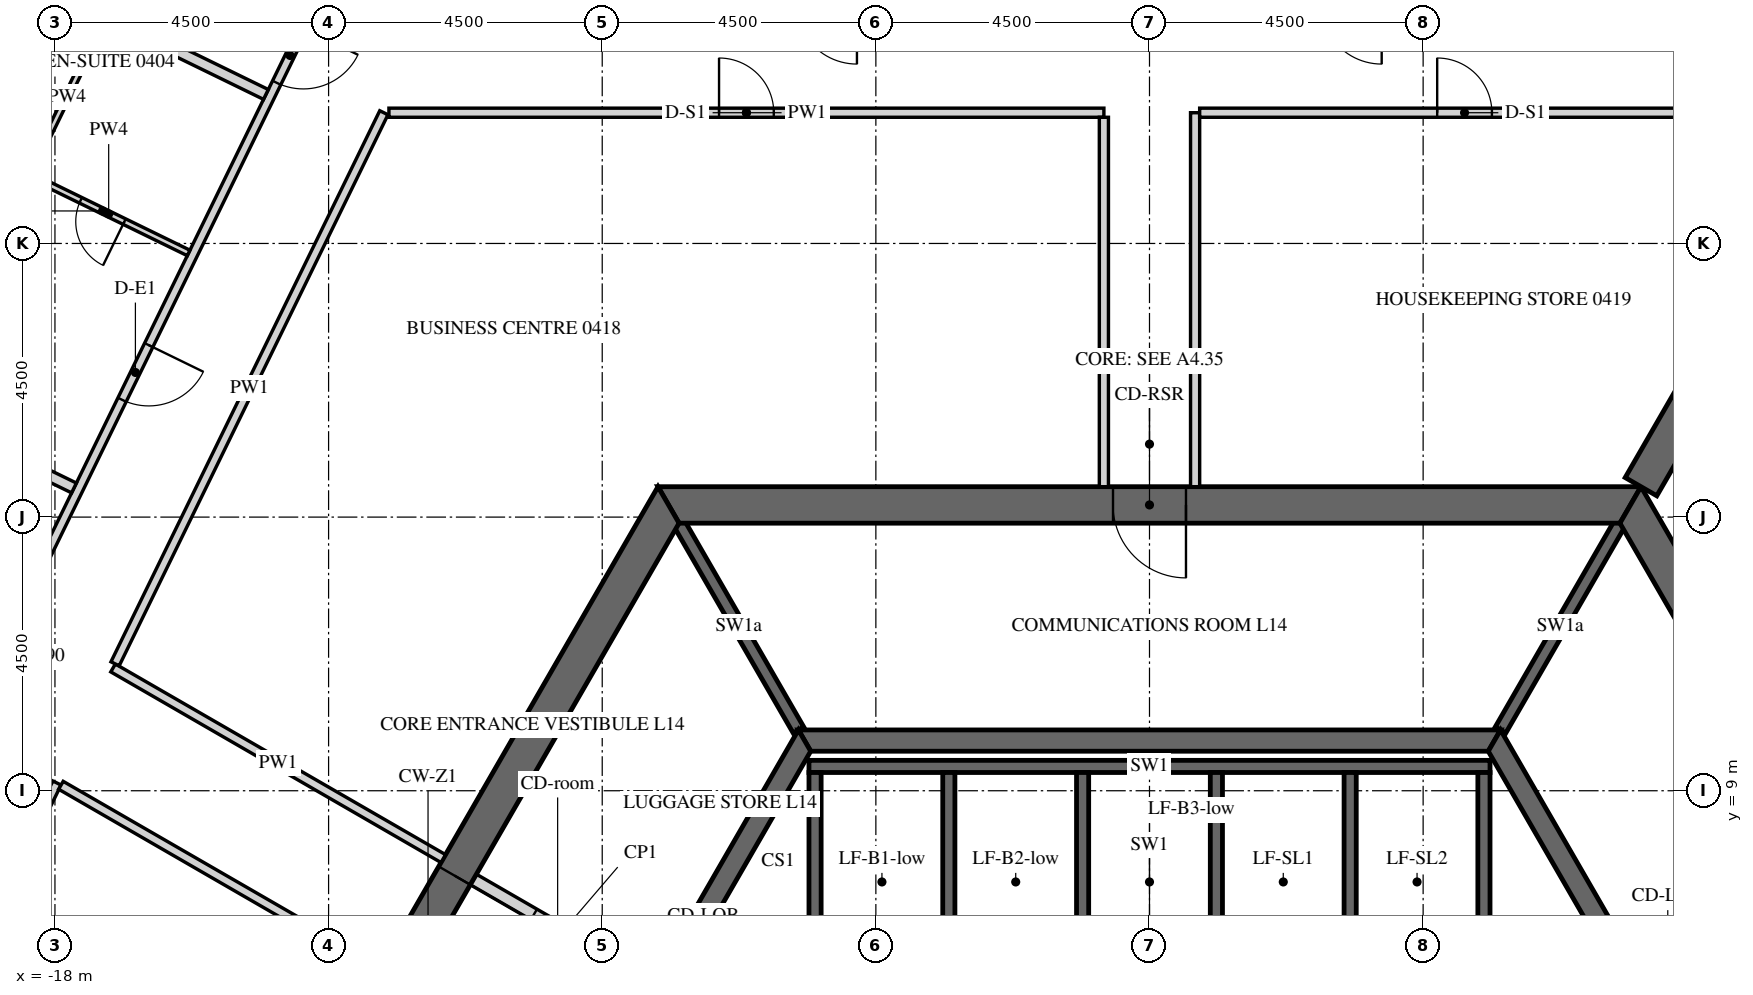
"""IFC4 building model, lengths in metres.
Left out: names, types, materials, properties, quantities, classifications, styles, units other than length and angle.
Written with IfcOpenShell. Run it as: python <this file> out.ifc"""

import sys

from ifc_helpers import new_model, si_unit, direction, frame, frame_2d, origin, place, context, subcontext, project, spatial, polyline, rectangle, outline, extrude, element, fill, save


model = new_model("IFC4")
c1 = context("Model", 3, precision=1e-05, world=origin(), true_north=direction((0.0, 1.0)))
c2 = subcontext(c1, "Body", "Model", "MODEL_VIEW")
j1 = project(units=[si_unit("LENGTHUNIT", "METRE"), si_unit("PLANEANGLEUNIT", "RADIAN")], contexts=[c1])
p1 = place(None, origin())
s1 = spatial("IfcSite", under=j1, at=p1, CompositionType="ELEMENT")
p2 = place(p1, origin())
s2 = spatial("IfcBuilding", under=s1, at=p2, CompositionType="ELEMENT")
p3 = place(p2, frame((0.0, 0.0, 68.7)))
s3 = spatial("IfcBuildingStorey", under=s2, at=p3, CompositionType="ELEMENT", Elevation=68.7)
p4 = place(p3, frame((-7.91, 13.7, -0.15), z_axis=(0.0, 0.0, 1.0), x_axis=(-0.499999880136, -0.866025472988, 0.0)))
e1 = element("IfcWall", 1, at=p4, inside=s3, PredefinedType="SHEAR", context=c2, shape_type="SweptSolid", body=[
    extrude(outline(polyline([(-0.173, -0.3), (15.993, -0.3), (15.646, 0.3), (0.173, 0.3), (-0.173, -0.3)])), origin(), (0.0, 0.0, 1.0), 3.9),
])
p5 = place(p4, frame((7.039, 0.0, 0.15)))
e2 = element("IfcOpeningElement", 2, at=p5, cuts=e1, PredefinedType="OPENING", context=c2, shape_type="SweptSolid", body=[
    extrude(rectangle(XDim=1.8, YDim=2.4, at=frame_2d((0.9, 1.2))), frame((0.0, 0.31, 0.0), z_axis=(0.0, -1.0, 0.0), x_axis=(1.0, 0.0, 0.0)), (0.0, 0.0, 1.0), 0.62),
])
p6 = place(p3, frame((15.819, 0.0, -0.15), z_axis=(0.0, 0.0, 1.0), x_axis=(-0.499999880136, 0.866025472988, 0.0)))
e3 = element("IfcWall", 3, at=p6, inside=s3, PredefinedType="SHEAR", context=c2, shape_type="SweptSolid", body=[
    extrude(outline(polyline([(-0.173, -0.3), (15.993, -0.3), (15.646, 0.3), (0.173, 0.3), (-0.173, -0.3)])), origin(), (0.0, 0.0, 1.0), 3.9),
])
p7 = place(p6, frame((6.981, 0.0, 0.15)))
e4 = element("IfcOpeningElement", 4, at=p7, cuts=e3, PredefinedType="OPENING", context=c2, shape_type="SweptSolid", body=[
    extrude(rectangle(XDim=1.8, YDim=2.4, at=frame_2d((0.9, 1.2))), frame((0.0, 0.31, 0.0), z_axis=(0.0, -1.0, 0.0), x_axis=(1.0, 0.0, 0.0)), (0.0, 0.0, 1.0), 0.62),
])
p8 = place(p3, frame((7.91, 13.7, -0.15), z_axis=(0.0, 0.0, 1.0), x_axis=(-1.0, 0.0, 0.0)))
e5 = element("IfcWall", 5, at=p8, inside=s3, PredefinedType="SHEAR", context=c2, shape_type="SweptSolid", body=[
    extrude(outline(polyline([(-0.173, -0.3), (15.993, -0.3), (15.646, 0.3), (0.173, 0.3), (-0.173, -0.3)])), origin(), (0.0, 0.0, 1.0), 3.9),
])
p9 = place(p8, frame((7.31, 0.0, 0.15)))
e6 = element("IfcOpeningElement", 6, at=p9, cuts=e5, PredefinedType="OPENING", context=c2, shape_type="SweptSolid", body=[
    extrude(rectangle(XDim=1.2, YDim=2.4, at=frame_2d((0.6, 1.2))), frame((0.0, 0.31, 0.0), z_axis=(0.0, -1.0, 0.0), x_axis=(1.0, 0.0, 0.0)), (0.0, 0.0, 1.0), 0.62),
])
p10 = place(p3, frame((8.083, 14.0, -0.15), z_axis=(0.0, 0.0, 1.0), x_axis=(0.499997680643, 0.866026742862, 0.0)))
e7 = element("IfcWall", 7, at=p10, inside=s3, PredefinedType="SHEAR", context=c2, shape_type="SweptSolid", body=[
    extrude(rectangle(XDim=16.509, YDim=0.6, at=frame_2d((8.254, 0.0))), origin(), (0.0, 0.0, 1.0), 3.9),
])
p11 = place(p10, frame((7.354, 0.0, 0.15)))
e8 = element("IfcOpeningElement", 8, at=p11, cuts=e7, PredefinedType="OPENING", context=c2, shape_type="SweptSolid", body=[
    extrude(rectangle(XDim=1.8, YDim=2.4, at=frame_2d((0.9, 1.2))), frame((0.0, 0.31, 0.0), z_axis=(0.0, -1.0, 0.0), x_axis=(1.0, 0.0, 0.0)), (0.0, 0.0, 1.0), 0.62),
])
p12 = place(p3, frame((-5.673, 9.825, -0.15), z_axis=(0.0, 0.0, 1.0), x_axis=(-0.499995046907, -0.866028263435, 0.0)))
e9 = element("IfcWall", 9, at=p12, inside=s3, PredefinedType="SHEAR", context=c2, shape_type="SweptSolid", body=[
    extrude(outline(polyline([(-0.101, -0.175), (11.446, -0.175), (11.244, 0.175), (0.101, 0.175), (-0.101, -0.175)])), origin(), (0.0, 0.0, 1.0), 3.9),
])
p13 = place(p12, frame((4.801, 0.0, 0.15)))
e10 = element("IfcOpeningElement", 10, at=p13, cuts=e9, PredefinedType="OPENING", context=c2, shape_type="SweptSolid", body=[
    extrude(rectangle(XDim=1.8, YDim=2.4, at=frame_2d((0.9, 1.2))), frame((0.0, 0.185, 0.0), z_axis=(0.0, -1.0, 0.0), x_axis=(1.0, 0.0, 0.0)), (0.0, 0.0, 1.0), 0.37),
])
p14 = place(p3, frame((11.345, 0.0, -0.15), z_axis=(0.0, 0.0, 1.0), x_axis=(-0.499995046907, 0.866028263435, 0.0)))
e11 = element("IfcWall", 11, at=p14, inside=s3, PredefinedType="SHEAR", context=c2, shape_type="SweptSolid", body=[
    extrude(outline(polyline([(-0.101, -0.175), (11.446, -0.175), (11.244, 0.175), (0.101, 0.175), (-0.101, -0.175)])), origin(), (0.0, 0.0, 1.0), 3.9),
])
p15 = place(p14, frame((4.744, 0.0, 0.15)))
e12 = element("IfcOpeningElement", 12, at=p15, cuts=e11, PredefinedType="OPENING", context=c2, shape_type="SweptSolid", body=[
    extrude(rectangle(XDim=1.8, YDim=2.4, at=frame_2d((0.9, 1.2))), frame((0.0, 0.185, 0.0), z_axis=(0.0, -1.0, 0.0), x_axis=(1.0, 0.0, 0.0)), (0.0, 0.0, 1.0), 0.37),
])
p16 = place(p3, frame((5.673, 9.825, -0.15), z_axis=(0.0, 0.0, 1.0), x_axis=(-1.0, 0.0, 0.0)))
e13 = element("IfcWall", 13, at=p16, inside=s3, PredefinedType="SHEAR", context=c2, shape_type="SweptSolid", body=[
    extrude(outline(polyline([(-0.101, -0.175), (11.446, -0.175), (11.244, 0.175), (0.101, 0.175), (-0.101, -0.175)])), origin(), (0.0, 0.0, 1.0), 3.9),
])
p17 = place(p3, frame((-5.6, 9.4, -0.25), z_axis=(0.0, 0.0, 1.0), x_axis=(1.0, 0.0, 0.0)))
e14 = element("IfcWall", 14, at=p17, inside=s3, PredefinedType="SHEAR", context=c2, shape_type="SweptSolid", body=[
    extrude(rectangle(XDim=11.2, YDim=0.2, at=frame_2d((5.6, 0.0))), origin(), (0.0, 0.0, 1.0), 3.9),
])
for number, where, z_axis, x_axis in (
    (15, (-5.5, 6.4, -0.25), (0.0, 0.0, 1.0), (0.0, 1.0, 0.0)),
    (16, (-3.3, 6.4, -0.25), (0.0, 0.0, 1.0), (0.0, 1.0, 0.0)),
    (17, (-1.1, 6.4, -0.25), (0.0, 0.0, 1.0), (0.0, 1.0, 0.0)),
    (18, (1.1, 6.4, -0.25), (0.0, 0.0, 1.0), (0.0, 1.0, 0.0)),
    (19, (3.3, 6.4, -0.25), (0.0, 0.0, 1.0), (0.0, 1.0, 0.0)),
    (20, (5.5, 6.4, -0.25), (0.0, 0.0, 1.0), (0.0, 1.0, 0.0)),
):
    element("IfcWall", number, at=place(p3, frame(where, z_axis=z_axis, x_axis=x_axis)), inside=s3, PredefinedType="SHEAR", context=c2, shape_type="SweptSolid", body=[
        extrude(rectangle(XDim=2.9, YDim=0.2, at=frame_2d((1.45, 0.0))), origin(), (0.0, 0.0, 1.0), 3.9),
    ])
for number, where, z_axis, x_axis in (
    (21, (5.773, 10.0, -0.15), (0.0, 0.0, 1.0), (0.5, 0.866, 0.0)),
    (22, (-5.773, 10.0, -0.15), (0.0, 0.0, 1.0), (-0.5, 0.866, 0.0)),
):
    element("IfcWall", number, at=place(p3, frame(where, z_axis=z_axis, x_axis=x_axis)), inside=s3, PredefinedType="SHEAR", context=c2, shape_type="SweptSolid", body=[
        extrude(rectangle(XDim=3.926, YDim=0.2, at=frame_2d((1.963, 0.0))), origin(), (0.0, 0.0, 1.0), 3.9),
    ])
p18 = place(p3, frame((-8.175, 5.841, 0.0), z_axis=(0.0, 0.0, 1.0), x_axis=(-0.866020560687, 0.500008388397, 0.0)))
e23 = element("IfcWall", 23, at=p18, inside=s3, PredefinedType="PARTITIONING", context=c2, shape_type="SweptSolid", body=[
    extrude(rectangle(XDim=3.4, YDim=0.2, at=frame_2d((1.7, 0.0))), origin(), (0.0, 0.0, 1.0), 3.65),
])
p19 = place(p18, frame((1.35, 0.0, 0.0)))
e24 = element("IfcOpeningElement", 24, at=p19, cuts=e23, PredefinedType="OPENING", context=c2, shape_type="SweptSolid", body=[
    extrude(rectangle(XDim=0.9, YDim=2.1, at=frame_2d((0.45, 1.05))), frame((0.0, 0.11, 0.0), z_axis=(0.0, -1.0, 0.0), x_axis=(1.0, 0.0, 0.0)), (0.0, 0.0, 1.0), 0.22),
])
p20 = place(p3, frame((-13.752, 21.875, 0.0), z_axis=(0.0, 0.0, 1.0), x_axis=(-0.438374473378, -0.898792423806, 0.0)))
e25 = element("IfcWall", 25, at=p20, inside=s3, PredefinedType="PARTITIONING", context=c2, shape_type="SweptSolid", body=[
    extrude(rectangle(XDim=21.918, YDim=0.15, at=frame_2d((10.959, 0.0))), origin(), (0.0, 0.0, 1.0), 2.988),
])
p21 = place(p20, frame((0.371, 0.0, 0.0)))
e26 = element("IfcOpeningElement", 26, at=p21, cuts=e25, PredefinedType="OPENING", context=c2, shape_type="SweptSolid", body=[
    extrude(rectangle(XDim=1.0, YDim=2.1, at=frame_2d((0.5, 1.05))), frame((0.0, 0.085, 0.0), z_axis=(0.0, -1.0, 0.0), x_axis=(1.0, 0.0, 0.0)), (0.0, 0.0, 1.0), 0.17),
])
p22 = place(p20, frame((6.171, 0.0, 0.0)))
e27 = element("IfcOpeningElement", 27, at=p22, cuts=e25, PredefinedType="OPENING", context=c2, shape_type="SweptSolid", body=[
    extrude(rectangle(XDim=1.0, YDim=2.1, at=frame_2d((0.5, 1.05))), frame((0.0, 0.085, 0.0), z_axis=(0.0, -1.0, 0.0), x_axis=(1.0, 0.0, 0.0)), (0.0, 0.0, 1.0), 0.17),
])
p23 = place(p20, frame((13.612, 0.0, 0.0)))
e28 = element("IfcOpeningElement", 28, at=p23, cuts=e25, PredefinedType="OPENING", context=c2, shape_type="SweptSolid", body=[
    extrude(rectangle(XDim=1.0, YDim=2.1, at=frame_2d((0.5, 1.05))), frame((0.0, 0.085, 0.0), z_axis=(0.0, -1.0, 0.0), x_axis=(1.0, 0.0, 0.0)), (0.0, 0.0, 1.0), 0.17),
])
p24 = place(p3, frame((-11.614, 7.884, 0.0), z_axis=(0.0, 0.0, 1.0), x_axis=(-0.866025438137, 0.4999999405, 0.0)))
e29 = element("IfcWall", 29, at=p24, inside=s3, PredefinedType="PARTITIONING", context=c2, shape_type="SweptSolid", body=[
    extrude(rectangle(XDim=6.271, YDim=0.15, at=frame_2d((3.135, 0.0))), origin(), (0.0, 0.0, 1.0), 2.988),
])
p25 = place(p3, frame((-17.011, 11.087, 0.0), z_axis=(0.0, 0.0, 1.0), x_axis=(0.43836877185, 0.898795204631, 0.0)))
e30 = element("IfcWall", 30, at=p25, inside=s3, PredefinedType="PARTITIONING", context=c2, shape_type="SweptSolid", body=[
    extrude(rectangle(XDim=10.083, YDim=0.15, at=frame_2d((5.042, 0.0))), origin(), (0.0, 0.0, 1.0), 2.988),
])
p26 = place(p3, frame((-12.508, 20.15, 0.0), z_axis=(0.0, 0.0, 1.0), x_axis=(1.0, 0.0, 0.0)))
e31 = element("IfcWall", 31, at=p26, inside=s3, PredefinedType="PARTITIONING", context=c2, shape_type="SweptSolid", body=[
    extrude(rectangle(XDim=11.758, YDim=0.15, at=frame_2d((5.879, 0.0))), origin(), (0.0, 0.0, 1.0), 2.988),
])
p27 = place(p26, frame((5.429, 0.0, 0.0)))
e32 = element("IfcOpeningElement", 32, at=p27, cuts=e31, PredefinedType="OPENING", context=c2, shape_type="SweptSolid", body=[
    extrude(rectangle(XDim=0.9, YDim=2.1, at=frame_2d((0.45, 1.05))), frame((0.0, 0.085, 0.0), z_axis=(0.0, -1.0, 0.0), x_axis=(1.0, 0.0, 0.0)), (0.0, 0.0, 1.0), 0.17),
])
p28 = place(p3, frame((-0.75, 20.075, 0.0), z_axis=(0.0, 0.0, 1.0), x_axis=(0.0, -1.0, 0.0)))
e33 = element("IfcWall", 33, at=p28, inside=s3, PredefinedType="PARTITIONING", context=c2, shape_type="SweptSolid", body=[
    extrude(rectangle(XDim=6.075, YDim=0.15, at=frame_2d((3.038, 0.0))), origin(), (0.0, 0.0, 1.0), 2.988),
])
p29 = place(p3, frame((0.75, 14.0, 0.0), z_axis=(0.0, 0.0, 1.0), x_axis=(0.0, 1.0, 0.0)))
e34 = element("IfcWall", 34, at=p29, inside=s3, PredefinedType="PARTITIONING", context=c2, shape_type="SweptSolid", body=[
    extrude(rectangle(XDim=6.15, YDim=0.15, at=frame_2d((3.075, 0.0))), origin(), (0.0, 0.0, 1.0), 2.988),
])
p30 = place(p3, frame((0.825, 20.15, 0.0), z_axis=(0.0, 0.0, 1.0), x_axis=(1.0, 0.0, 0.0)))
e35 = element("IfcWall", 35, at=p30, inside=s3, PredefinedType="PARTITIONING", context=c2, shape_type="SweptSolid", body=[
    extrude(rectangle(XDim=8.712, YDim=0.15, at=frame_2d((4.356, 0.0))), origin(), (0.0, 0.0, 1.0), 2.988),
])
p31 = place(p30, frame((3.906, 0.0, 0.0)))
e36 = element("IfcOpeningElement", 36, at=p31, cuts=e35, PredefinedType="OPENING", context=c2, shape_type="SweptSolid", body=[
    extrude(rectangle(XDim=0.9, YDim=2.1, at=frame_2d((0.45, 1.05))), frame((0.0, 0.085, 0.0), z_axis=(0.0, -1.0, 0.0), x_axis=(1.0, 0.0, 0.0)), (0.0, 0.0, 1.0), 0.17),
])
p32 = place(p3, frame((-22.219, 0.41, 0.0), z_axis=(0.0, 0.0, 1.0), x_axis=(0.438391891827, 0.898783927972, 0.0)))
e37 = element("IfcWall", 37, at=p32, inside=s3, PredefinedType="PARTITIONING", context=c2, shape_type="SweptSolid", body=[
    extrude(rectangle(XDim=9.699, YDim=0.15, at=frame_2d((4.85, 0.0))), origin(), (0.0, 0.0, 1.0), 2.988),
])
p33 = place(p32, frame((4.4, 0.0, 0.0)))
e38 = element("IfcOpeningElement", 38, at=p33, cuts=e37, PredefinedType="OPENING", context=c2, shape_type="SweptSolid", body=[
    extrude(rectangle(XDim=0.9, YDim=2.1, at=frame_2d((0.45, 1.05))), frame((0.0, 0.085, 0.0), z_axis=(0.0, -1.0, 0.0), x_axis=(1.0, 0.0, 0.0)), (0.0, 0.0, 1.0), 0.17),
])
p34 = place(p3, frame((-17.902, 9.09, 0.0), z_axis=(0.0, 0.0, 1.0), x_axis=(0.866036368755, -0.499981007633, 0.0)))
e39 = element("IfcWall", 39, at=p34, inside=s3, PredefinedType="PARTITIONING", context=c2, shape_type="SweptSolid", body=[
    extrude(rectangle(XDim=6.049, YDim=0.15, at=frame_2d((3.024, 0.0))), origin(), (0.0, 0.0, 1.0), 2.988),
])
p35 = place(p3, frame((-21.204, 23.706, 0.0), z_axis=(0.0, 0.0, 1.0), x_axis=(0.898796252669, -0.438366623032, 0.0)))
e40 = element("IfcWall", 40, at=p35, inside=s3, PredefinedType="PARTITIONING", context=c2, shape_type="SweptSolid", body=[
    extrude(rectangle(XDim=7.425, YDim=0.18, at=frame_2d((3.712, 0.0))), origin(), (0.0, 0.0, 1.0), 2.988),
])
p36 = place(p3, frame((-15.802, 17.844, 0.0), z_axis=(0.0, 0.0, 1.0), x_axis=(-0.898790906006, 0.438377585285, 0.0)))
e41 = element("IfcWall", 41, at=p36, inside=s3, PredefinedType="PARTITIONING", context=c2, shape_type="SweptSolid", body=[
    extrude(rectangle(XDim=2.925, YDim=0.1, at=frame_2d((1.462, 0.0))), origin(), (0.0, 0.0, 1.0), 2.988),
])
p37 = place(p36, frame((1.175, 0.0, 0.0)))
e42 = element("IfcOpeningElement", 42, at=p37, cuts=e41, PredefinedType="OPENING", context=c2, shape_type="SweptSolid", body=[
    extrude(rectangle(XDim=0.8, YDim=2.1, at=frame_2d((0.4, 1.05))), frame((0.0, 0.06, 0.0), z_axis=(0.0, -1.0, 0.0), x_axis=(1.0, 0.0, 0.0)), (0.0, 0.0, 1.0), 0.12),
])
p38 = place(p3, frame((-18.409, 19.171, 0.0), z_axis=(0.0, 0.0, 1.0), x_axis=(0.438416660488, 0.898771846359, 0.0)))
e43 = element("IfcWall", 43, at=p38, inside=s3, PredefinedType="PARTITIONING", context=c2, shape_type="SweptSolid", body=[
    extrude(rectangle(XDim=2.76, YDim=0.1, at=frame_2d((1.38, 0.0))), origin(), (0.0, 0.0, 1.0), 2.988),
])
p39 = place(p3, frame((-24.36, 17.234, 0.0), z_axis=(0.0, 0.0, 1.0), x_axis=(0.898796252669, -0.438366623032, 0.0)))
e44 = element("IfcWall", 44, at=p39, inside=s3, PredefinedType="PARTITIONING", context=c2, shape_type="SweptSolid", body=[
    extrude(rectangle(XDim=7.425, YDim=0.18, at=frame_2d((3.712, 0.0))), origin(), (0.0, 0.0, 1.0), 2.988),
])
p40 = place(p5, origin())
e45 = element("IfcDoor", 45, at=p40, inside=s3, OperationType="DOUBLE_DOOR_SINGLE_SWING", PredefinedType="DOOR", context=c2, shape_type="SweptSolid", body=[
    extrude(rectangle(XDim=1.8, YDim=2.4, at=frame_2d((0.9, 1.2))), frame((0.0, 0.025, 0.0), z_axis=(0.0, -1.0, 0.0), x_axis=(1.0, 0.0, 0.0)), (0.0, 0.0, 1.0), 0.05),
])
fill(e2, e45)
p41 = place(p9, origin())
e46 = element("IfcDoor", 46, at=p41, inside=s3, OperationType="SINGLE_SWING_LEFT", PredefinedType="DOOR", context=c2, shape_type="SweptSolid", body=[
    extrude(rectangle(XDim=1.2, YDim=2.4, at=frame_2d((0.6, 1.2))), frame((0.0, 0.025, 0.0), z_axis=(0.0, -1.0, 0.0), x_axis=(1.0, 0.0, 0.0)), (0.0, 0.0, 1.0), 0.05),
])
fill(e6, e46)
p42 = place(p19, origin())
e47 = element("IfcDoor", 47, at=p42, inside=s3, OperationType="SINGLE_SWING_LEFT", PredefinedType="DOOR", context=c2, shape_type="SweptSolid", body=[
    extrude(rectangle(XDim=0.9, YDim=2.1, at=frame_2d((0.45, 1.05))), frame((0.0, 0.025, 0.0), z_axis=(0.0, -1.0, 0.0), x_axis=(1.0, 0.0, 0.0)), (0.0, 0.0, 1.0), 0.05),
])
fill(e24, e47)
p43 = place(p21, origin())
e48 = element("IfcDoor", 48, at=p43, inside=s3, OperationType="SINGLE_SWING_LEFT", PredefinedType="DOOR", context=c2, shape_type="SweptSolid", body=[
    extrude(rectangle(XDim=1.0, YDim=2.1, at=frame_2d((0.5, 1.05))), frame((0.0, 0.025, 0.0), z_axis=(0.0, -1.0, 0.0), x_axis=(1.0, 0.0, 0.0)), (0.0, 0.0, 1.0), 0.05),
])
fill(e26, e48)
p44 = place(p22, origin())
e49 = element("IfcDoor", 49, at=p44, inside=s3, OperationType="SINGLE_SWING_LEFT", PredefinedType="DOOR", context=c2, shape_type="SweptSolid", body=[
    extrude(rectangle(XDim=1.0, YDim=2.1, at=frame_2d((0.5, 1.05))), frame((0.0, 0.025, 0.0), z_axis=(0.0, -1.0, 0.0), x_axis=(1.0, 0.0, 0.0)), (0.0, 0.0, 1.0), 0.05),
])
fill(e27, e49)
p45 = place(p37, origin())
e50 = element("IfcDoor", 50, at=p45, inside=s3, OperationType="SINGLE_SWING_LEFT", PredefinedType="DOOR", context=c2, shape_type="SweptSolid", body=[
    extrude(rectangle(XDim=0.8, YDim=2.1, at=frame_2d((0.4, 1.05))), frame((0.0, 0.025, 0.0), z_axis=(0.0, -1.0, 0.0), x_axis=(1.0, 0.0, 0.0)), (0.0, 0.0, 1.0), 0.05),
])
fill(e42, e50)
p46 = place(p27, origin())
e51 = element("IfcDoor", 51, at=p46, inside=s3, OperationType="SINGLE_SWING_RIGHT", PredefinedType="DOOR", context=c2, shape_type="SweptSolid", body=[
    extrude(rectangle(XDim=0.9, YDim=2.1, at=frame_2d((0.45, 1.05))), frame((0.0, 0.025, 0.0), z_axis=(0.0, -1.0, 0.0), x_axis=(1.0, 0.0, 0.0)), (0.0, 0.0, 1.0), 0.05),
])
fill(e32, e51)
p47 = place(p31, origin())
e52 = element("IfcDoor", 52, at=p47, inside=s3, OperationType="SINGLE_SWING_RIGHT", PredefinedType="DOOR", context=c2, shape_type="SweptSolid", body=[
    extrude(rectangle(XDim=0.9, YDim=2.1, at=frame_2d((0.45, 1.05))), frame((0.0, 0.025, 0.0), z_axis=(0.0, -1.0, 0.0), x_axis=(1.0, 0.0, 0.0)), (0.0, 0.0, 1.0), 0.05),
])
fill(e36, e52)
save(model, sys.argv[1])
